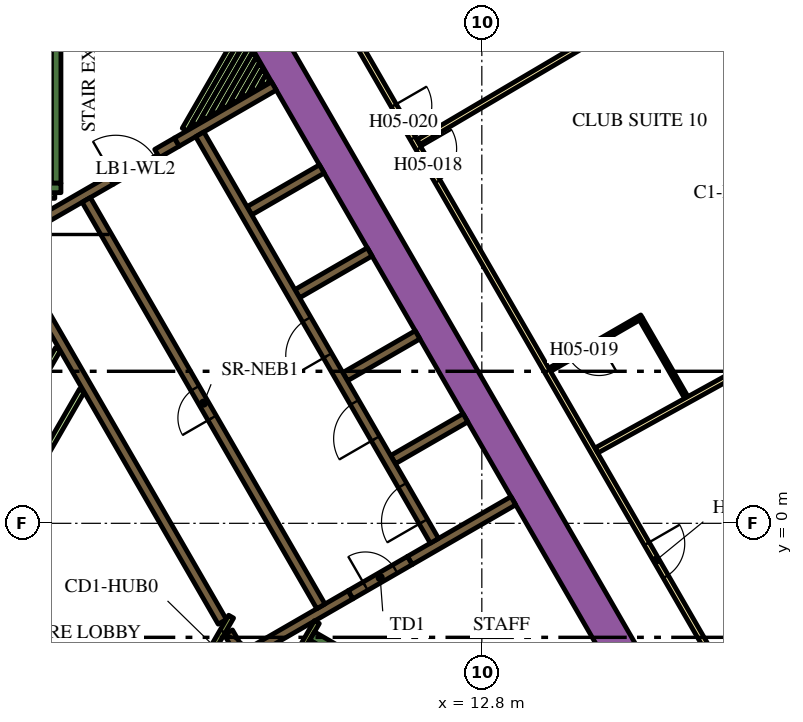
"""IFC4 building model, lengths in metres.
Left out: names, types, materials, properties, quantities, classifications, styles, units other than length and angle.
Written with IfcOpenShell. Run it as: python <this file> out.ifc"""

import sys

from ifc_helpers import new_model, si_unit, direction, frame, frame_2d, origin, place, context, subcontext, project, spatial, rectangle, extrude, element, fill, save


model = new_model("IFC4")
c1 = context("Model", 3, precision=1e-05, world=origin(), true_north=direction((0.0, 1.0)))
c2 = subcontext(c1, "Body", "Model", "MODEL_VIEW")
j1 = project(units=[si_unit("LENGTHUNIT", "METRE"), si_unit("PLANEANGLEUNIT", "RADIAN")], contexts=[c1])
p1 = place(None, origin())
s1 = spatial("IfcSite", under=j1, at=p1, CompositionType="ELEMENT")
p2 = place(p1, origin())
s2 = spatial("IfcBuilding", under=s1, at=p2, CompositionType="ELEMENT")
p3 = place(p2, frame((0.0, 0.0, 74.4)))
s3 = spatial("IfcBuildingStorey", under=s2, at=p3, CompositionType="ELEMENT", Elevation=74.4)
p4 = place(p3, frame((6.461, 13.909, 0.0), z_axis=(0.0, 0.0, 1.0), x_axis=(0.500005804227, -0.866022052686, 0.0)))
e1 = element("IfcWall", 1, at=p4, inside=s3, PredefinedType="SOLIDWALL", context=c2, shape_type="SweptSolid", body=[
    extrude(rectangle(XDim=20.834, YDim=0.9, at=frame_2d((10.417, 0.0))), origin(), (0.0, 0.0, 1.0), 3.9),
])
p5 = place(p3, frame((8.334, -2.964, 0.0), z_axis=(0.0, 0.0, 1.0), x_axis=(0.866016039709, -0.500016218704, 0.0)))
e2 = element("IfcWall", 2, at=p5, inside=s3, PredefinedType="SOLIDWALL", context=c2, shape_type="SweptSolid", body=[
    extrude(rectangle(XDim=7.05, YDim=0.25, at=frame_2d((3.525, 0.0))), origin(), (0.0, 0.0, 1.0), 3.9),
])
p6 = place(p3, frame((8.168, -3.503, 0.0), z_axis=(0.0, 0.0, 1.0), x_axis=(0.49972245349, 0.866185586049, 0.0)))
e3 = element("IfcWall", 3, at=p6, inside=s3, PredefinedType="SOLIDWALL", context=c2, shape_type="SweptSolid", body=[
    extrude(rectangle(XDim=0.425, YDim=0.25, at=frame_2d((0.212, 0.0))), origin(), (0.0, 0.0, 1.0), 3.9),
])
p7 = place(p3, frame((1.6, 8.95, 0.0), z_axis=(0.0, 0.0, 1.0), x_axis=(0.0, 1.0, 0.0)))
e4 = element("IfcWall", 4, at=p7, inside=s3, PredefinedType="SOLIDWALL", context=c2, shape_type="SweptSolid", body=[
    extrude(rectangle(XDim=6.8, YDim=0.25, at=frame_2d((3.4, 0.0))), origin(), (0.0, 0.0, 1.0), 3.9),
])
p8 = place(p3, frame((1.05, 8.825, 0.0), z_axis=(0.0, 0.0, 1.0), x_axis=(1.0, 0.0, 0.0)))
e5 = element("IfcWall", 5, at=p8, inside=s3, PredefinedType="SOLIDWALL", context=c2, shape_type="SweptSolid", body=[
    extrude(rectangle(XDim=0.675, YDim=0.25, at=frame_2d((0.337, 0.0))), origin(), (0.0, 0.0, 1.0), 3.9),
])
p9 = place(p3, frame((10.464, 1.677, 0.0), z_axis=(0.0, 0.0, 1.0), x_axis=(0.86605622881, 0.499946605688, 0.0)))
e6 = element("IfcWall", 6, at=p9, inside=s3, PredefinedType="SOLIDWALL", context=c2, shape_type="SweptSolid", body=[
    extrude(rectangle(XDim=2.2, YDim=0.25, at=frame_2d((1.1, 0.0))), origin(), (0.0, 0.0, 1.0), 3.9),
])
p10 = place(p3, frame((13.629, 0.594, 0.0), z_axis=(0.0, 0.0, 1.0), x_axis=(-0.86602790099, -0.499995674689, 0.0)))
e7 = element("IfcWall", 7, at=p10, inside=s3, PredefinedType="SOLIDWALL", context=c2, shape_type="SweptSolid", body=[
    extrude(rectangle(XDim=3.146, YDim=0.25, at=frame_2d((1.573, 0.0))), origin(), (0.0, 0.0, 1.0), 3.9),
])
p11 = place(p3, frame((9.346, -1.879, 0.0), z_axis=(0.0, 0.0, 1.0), x_axis=(-0.866048528039, -0.499959945477, 0.0)))
e8 = element("IfcWall", 8, at=p11, inside=s3, PredefinedType="SOLIDWALL", context=c2, shape_type="SweptSolid", body=[
    extrude(rectangle(XDim=3.47, YDim=0.25, at=frame_2d((1.735, 0.0))), origin(), (0.0, 0.0, 1.0), 3.9),
])
p12 = place(p3, frame((6.13, -2.867, 0.0), z_axis=(0.0, 0.0, 1.0), x_axis=(0.500160776593, -0.865932559475, 0.0)))
e9 = element("IfcWall", 9, at=p12, inside=s3, PredefinedType="SOLIDWALL", context=c2, shape_type="SweptSolid", body=[
    extrude(rectangle(XDim=0.627, YDim=0.25, at=frame_2d((0.313, 0.0))), origin(), (0.0, 0.0, 1.0), 3.9),
])
for number, where, z_axis, x_axis in (
    (10, (9.204, 3.859, 0.0), (0.0, 0.0, 1.0), (0.866, 0.5, 0.0)),
    (11, (7.944, 6.041, 0.0), (0.0, 0.0, 1.0), (0.866, 0.5, 0.0)),
    (12, (6.684, 8.224, 0.0), (0.0, 0.0, 1.0), (0.866, 0.5, 0.0)),
):
    element("IfcWall", number, at=place(p3, frame(where, z_axis=z_axis, x_axis=x_axis)), inside=s3, PredefinedType="SOLIDWALL", context=c2, shape_type="SweptSolid", body=[
        extrude(rectangle(XDim=2.2, YDim=0.25, at=frame_2d((1.1, 0.0))), origin(), (0.0, 0.0, 1.0), 3.9),
    ])
p13 = place(p3, frame((4.254, 9.731, 0.0), z_axis=(0.0, 0.0, 1.0), x_axis=(0.866056883327, 0.499945471869, 0.0)))
e13 = element("IfcWall", 13, at=p13, inside=s3, PredefinedType="SOLIDWALL", context=c2, shape_type="SweptSolid", body=[
    extrude(rectangle(XDim=0.6, YDim=0.25, at=frame_2d((0.3, 0.0))), origin(), (0.0, 0.0, 1.0), 3.9),
])
p14 = place(p3, frame((4.776, 10.032, 0.0), z_axis=(0.0, 0.0, 1.0), x_axis=(0.86600215702, 0.500040262416, 0.0)))
e14 = element("IfcWall", 14, at=p14, inside=s3, PredefinedType="SOLIDWALL", context=c2, shape_type="SweptSolid", body=[
    extrude(rectangle(XDim=2.948, YDim=0.25, at=frame_2d((1.474, 0.0))), origin(), (0.0, 0.0, 1.0), 3.9),
])
p15 = place(p3, frame((0.098, 7.331, 0.0), z_axis=(0.0, 0.0, 1.0), x_axis=(0.865988154826, 0.50006451154, 0.0)))
e15 = element("IfcWall", 15, at=p15, inside=s3, PredefinedType="SOLIDWALL", context=c2, shape_type="SweptSolid", body=[
    extrude(rectangle(XDim=3.398, YDim=0.25, at=frame_2d((1.699, 0.0))), origin(), (0.0, 0.0, 1.0), 3.9),
])
p16 = place(p3, frame((5.97, -2.591, 0.0), z_axis=(0.0, 0.0, 1.0), x_axis=(-0.499994469932, 0.866028596547, 0.0)))
e16 = element("IfcWall", 16, at=p16, inside=s3, PredefinedType="SOLIDWALL", context=c2, shape_type="SweptSolid", body=[
    extrude(rectangle(XDim=10.488, YDim=0.25, at=frame_2d((5.244, 0.0))), origin(), (0.0, 0.0, 1.0), 3.9),
])
p17 = place(p3, frame((8.459, -2.599, 0.0), z_axis=(0.0, 0.0, 1.0), x_axis=(-0.500041054325, -0.866001699761, 0.0)))
e17 = element("IfcWall", 17, at=p17, inside=s3, PredefinedType="PARTITIONING", context=c2, shape_type="SweptSolid", body=[
    extrude(rectangle(XDim=0.929, YDim=0.15, at=frame_2d((0.464, 0.0))), origin(), (0.0, 0.0, 1.0), 3.9),
])
p18 = place(p3, frame((-1.887, -3.718, 0.0), z_axis=(0.0, 0.0, 1.0), x_axis=(0.500005008002, 0.866022512394, 0.0)))
e18 = element("IfcWall", 18, at=p18, inside=s3, PredefinedType="PARTITIONING", context=c2, shape_type="SweptSolid", body=[
    extrude(rectangle(XDim=8.327, YDim=0.15, at=frame_2d((4.164, 0.0))), origin(), (0.0, 0.0, 1.0), 2.7),
])
p19 = place(p3, frame((-0.3, 1.212, 0.0), z_axis=(0.0, 0.0, 1.0), x_axis=(0.499963101113, 0.866046706318, 0.0)))
e19 = element("IfcWall", 19, at=p19, inside=s3, PredefinedType="PARTITIONING", context=c2, shape_type="SweptSolid", body=[
    extrude(rectangle(XDim=3.893, YDim=0.15, at=frame_2d((1.947, 0.0))), origin(), (0.0, 0.0, 1.0), 2.7),
])
p20 = place(p3, frame((1.05, 8.625, 0.0), z_axis=(0.0, 0.0, 1.0), x_axis=(1.0, 0.0, 0.0)))
e20 = element("IfcWall", 20, at=p20, inside=s3, PredefinedType="PARTITIONING", context=c2, shape_type="SweptSolid", body=[
    extrude(rectangle(XDim=0.514, YDim=0.15, at=frame_2d((0.257, 0.0))), origin(), (0.0, 0.0, 1.0), 2.7),
])
p21 = place(p3, frame((4.982, 10.359, 0.0), z_axis=(0.0, 0.0, 1.0), x_axis=(0.500051824031, 0.865995481099, 0.0)))
e21 = element("IfcWall", 21, at=p21, inside=s3, PredefinedType="PARTITIONING", context=c2, shape_type="SweptSolid", body=[
    extrude(rectangle(XDim=2.973, YDim=0.15, at=frame_2d((1.486, 0.0))), origin(), (0.0, 0.0, 1.0), 2.7),
])
p22 = place(p3, frame((5.242, 10.509, 0.0), z_axis=(0.0, 0.0, 1.0), x_axis=(0.499958506883, 0.866049358521, 0.0)))
e22 = element("IfcWall", 22, at=p22, inside=s3, PredefinedType="PARTITIONING", context=c2, shape_type="SweptSolid", body=[
    extrude(rectangle(XDim=2.626, YDim=0.15, at=frame_2d((1.313, 0.0))), origin(), (0.0, 0.0, 1.0), 2.7),
])
p23 = place(p3, frame((5.501, 10.659, 0.0), z_axis=(0.0, 0.0, 1.0), x_axis=(0.499951092774, 0.866053638543, 0.0)))
e23 = element("IfcWall", 23, at=p23, inside=s3, PredefinedType="PARTITIONING", context=c2, shape_type="SweptSolid", body=[
    extrude(rectangle(XDim=2.28, YDim=0.15, at=frame_2d((1.14, 0.0))), origin(), (0.0, 0.0, 1.0), 2.7),
])
p24 = place(p3, frame((5.761, 10.809, 0.0), z_axis=(0.0, 0.0, 1.0), x_axis=(0.499900985997, 0.866082561999, 0.0)))
e24 = element("IfcWall", 24, at=p24, inside=s3, PredefinedType="PARTITIONING", context=c2, shape_type="SweptSolid", body=[
    extrude(rectangle(XDim=1.934, YDim=0.15, at=frame_2d((0.967, 0.0))), origin(), (0.0, 0.0, 1.0), 2.7),
])
p25 = place(p3, frame((6.021, 10.959, 0.0), z_axis=(0.0, 0.0, 1.0), x_axis=(0.499944387978, 0.86605750902, 0.0)))
e25 = element("IfcWall", 25, at=p25, inside=s3, PredefinedType="PARTITIONING", context=c2, shape_type="SweptSolid", body=[
    extrude(rectangle(XDim=1.587, YDim=0.15, at=frame_2d((0.793, 0.0))), origin(), (0.0, 0.0, 1.0), 2.7),
])
p26 = place(p3, frame((6.281, 11.109, 0.0), z_axis=(0.0, 0.0, 1.0), x_axis=(0.500012022864, 0.866018462269, 0.0)))
e26 = element("IfcWall", 26, at=p26, inside=s3, PredefinedType="PARTITIONING", context=c2, shape_type="SweptSolid", body=[
    extrude(rectangle(XDim=1.241, YDim=0.15, at=frame_2d((0.62, 0.0))), origin(), (0.0, 0.0, 1.0), 2.7),
])
p27 = place(p3, frame((6.541, 11.259, 0.0), z_axis=(0.0, 0.0, 1.0), x_axis=(0.500132045864, 0.865949153646, 0.0)))
e27 = element("IfcWall", 27, at=p27, inside=s3, PredefinedType="PARTITIONING", context=c2, shape_type="SweptSolid", body=[
    extrude(rectangle(XDim=0.894, YDim=0.15, at=frame_2d((0.447, 0.0))), origin(), (0.0, 0.0, 1.0), 2.7),
])
p28 = place(p3, frame((6.8, 11.409, 0.0), z_axis=(0.0, 0.0, 1.0), x_axis=(0.500210807569, 0.865903659763, 0.0)))
e28 = element("IfcWall", 28, at=p28, inside=s3, PredefinedType="PARTITIONING", context=c2, shape_type="SweptSolid", body=[
    extrude(rectangle(XDim=0.548, YDim=0.15, at=frame_2d((0.274, 0.0))), origin(), (0.0, 0.0, 1.0), 2.7),
])
p29 = place(p3, frame((7.06, 11.559, 0.0), z_axis=(0.0, 0.0, 1.0), x_axis=(0.499267785915, 0.866447735266, 0.0)))
e29 = element("IfcWall", 29, at=p29, inside=s3, PredefinedType="PARTITIONING", context=c2, shape_type="SweptSolid", body=[
    extrude(rectangle(XDim=0.201, YDim=0.15, at=frame_2d((0.101, 0.0))), origin(), (0.0, 0.0, 1.0), 2.7),
])
p30 = place(p3, frame((11.553, -0.46, 0.0), z_axis=(0.0, 0.0, 1.0), x_axis=(-0.500006514828, 0.866021642414, 0.0)))
e30 = element("IfcWall", 30, at=p30, inside=s3, PredefinedType="SOLIDWALL", context=c2, shape_type="SweptSolid", body=[
    extrude(rectangle(XDim=12.35, YDim=0.25, at=frame_2d((6.175, 0.0))), origin(), (0.0, 0.0, 1.0), 3.9),
])
p31 = place(p30, frame((0.585, 0.0, 0.0)))
e31 = element("IfcOpeningElement", 31, at=p31, cuts=e30, PredefinedType="OPENING", context=c2, shape_type="SweptSolid", body=[
    extrude(rectangle(XDim=1.1, YDim=2.1, at=frame_2d((0.55, 1.05))), frame((0.0, 0.135, 0.0), z_axis=(0.0, -1.0, 0.0), x_axis=(1.0, 0.0, 0.0)), (0.0, 0.0, 1.0), 0.27),
])
p32 = place(p30, frame((3.105, 0.0, 0.0)))
e32 = element("IfcOpeningElement", 32, at=p32, cuts=e30, PredefinedType="OPENING", context=c2, shape_type="SweptSolid", body=[
    extrude(rectangle(XDim=1.1, YDim=2.1, at=frame_2d((0.55, 1.05))), frame((0.0, 0.135, 0.0), z_axis=(0.0, -1.0, 0.0), x_axis=(1.0, 0.0, 0.0)), (0.0, 0.0, 1.0), 0.27),
])
p33 = place(p30, frame((5.625, 0.0, 0.0)))
e33 = element("IfcOpeningElement", 33, at=p33, cuts=e30, PredefinedType="OPENING", context=c2, shape_type="SweptSolid", body=[
    extrude(rectangle(XDim=1.1, YDim=2.1, at=frame_2d((0.55, 1.05))), frame((0.0, 0.135, 0.0), z_axis=(0.0, -1.0, 0.0), x_axis=(1.0, 0.0, 0.0)), (0.0, 0.0, 1.0), 0.27),
])
p34 = place(p3, frame((8.565, -2.185, 0.0), z_axis=(0.0, 0.0, 1.0), x_axis=(-0.499997954832, 0.866026584559, 0.0)))
e34 = element("IfcWall", 34, at=p34, inside=s3, PredefinedType="SOLIDWALL", context=c2, shape_type="SweptSolid", body=[
    extrude(rectangle(XDim=12.35, YDim=0.25, at=frame_2d((6.175, 0.0))), origin(), (0.0, 0.0, 1.0), 3.9),
])
p35 = place(p34, frame((5.725, 0.0, 0.0)))
e35 = element("IfcOpeningElement", 35, at=p35, cuts=e34, PredefinedType="OPENING", context=c2, shape_type="SweptSolid", body=[
    extrude(rectangle(XDim=0.9, YDim=2.1, at=frame_2d((0.45, 1.05))), frame((0.0, 0.135, 0.0), z_axis=(0.0, -1.0, 0.0), x_axis=(1.0, 0.0, 0.0)), (0.0, 0.0, 1.0), 0.27),
])
p36 = place(p3, frame((9.346, -1.879, 0.0), z_axis=(0.0, 0.0, 1.0), x_axis=(0.866047807691, 0.499961193289, 0.0)))
e36 = element("IfcWall", 36, at=p36, inside=s3, PredefinedType="SOLIDWALL", context=c2, shape_type="SweptSolid", body=[
    extrude(rectangle(XDim=1.8, YDim=0.25, at=frame_2d((0.9, 0.0))), origin(), (0.0, 0.0, 1.0), 3.9),
])
p37 = place(p36, frame((0.45, 0.0, 0.0)))
e37 = element("IfcOpeningElement", 37, at=p37, cuts=e36, PredefinedType="OPENING", context=c2, shape_type="SweptSolid", body=[
    extrude(rectangle(XDim=0.9, YDim=2.1, at=frame_2d((0.45, 1.05))), frame((0.0, 0.135, 0.0), z_axis=(0.0, -1.0, 0.0), x_axis=(1.0, 0.0, 0.0)), (0.0, 0.0, 1.0), 0.27),
])
p38 = place(p3, frame((6.203, -2.456, 0.0), z_axis=(0.0, 0.0, 1.0), x_axis=(-0.500043961785, -0.866000020948, 0.0)))
e38 = element("IfcWall", 38, at=p38, inside=s3, PredefinedType="PARTITIONING", context=c2, shape_type="SweptSolid", body=[
    extrude(rectangle(XDim=1.95, YDim=0.15, at=frame_2d((0.975, 0.0))), origin(), (0.0, 0.0, 1.0), 3.9),
])
p39 = place(p38, frame((0.45, 0.0, 0.0)))
e39 = element("IfcOpeningElement", 39, at=p39, cuts=e38, PredefinedType="OPENING", context=c2, shape_type="SweptSolid", body=[
    extrude(rectangle(XDim=0.9, YDim=2.1, at=frame_2d((0.45, 1.05))), frame((0.0, 0.085, 0.0), z_axis=(0.0, -1.0, 0.0), x_axis=(1.0, 0.0, 0.0)), (0.0, 0.0, 1.0), 0.17),
])
p40 = place(p3, frame((3.081, 8.961, 0.0), z_axis=(0.0, 0.0, 1.0), x_axis=(0.866034573852, 0.49998411664, 0.0)))
e40 = element("IfcWall", 40, at=p40, inside=s3, PredefinedType="PARTITIONING", context=c2, shape_type="SweptSolid", body=[
    extrude(rectangle(XDim=1.4, YDim=0.09, at=frame_2d((0.7, 0.0))), origin(), (0.0, 0.0, 1.0), 2.7),
])
p41 = place(p40, frame((0.1, 0.0, 0.0)))
e41 = element("IfcOpeningElement", 41, at=p41, cuts=e40, PredefinedType="OPENING", context=c2, shape_type="SweptSolid", body=[
    extrude(rectangle(XDim=1.2, YDim=2.1, at=frame_2d((0.6, 1.05))), frame((0.0, 0.055, 0.0), z_axis=(0.0, -1.0, 0.0), x_axis=(1.0, 0.0, 0.0)), (0.0, 0.0, 1.0), 0.11),
])
p42 = place(p3, frame((6.163, 18.475, 0.0), z_axis=(0.0, 0.0, 1.0), x_axis=(0.500001317485, -0.866024643133, 0.0)))
e42 = element("IfcWall", 42, at=p42, inside=s3, PredefinedType="PARTITIONING", context=c2, shape_type="SweptSolid", body=[
    extrude(rectangle(XDim=25.767, YDim=0.15, at=frame_2d((12.883, 0.0))), origin(), (0.0, 0.0, 1.0), 2.7),
])
p43 = place(p42, frame((21.953, 0.0, 0.0)))
e43 = element("IfcOpeningElement", 43, at=p43, cuts=e42, PredefinedType="OPENING", context=c2, shape_type="SweptSolid", body=[
    extrude(rectangle(XDim=1.0, YDim=2.1, at=frame_2d((0.5, 1.05))), frame((0.0, 0.085, 0.0), z_axis=(0.0, -1.0, 0.0), x_axis=(1.0, 0.0, 0.0)), (0.0, 0.0, 1.0), 0.17),
])
p44 = place(p42, frame((9.948, 0.0, 0.0)))
e44 = element("IfcOpeningElement", 44, at=p44, cuts=e42, PredefinedType="OPENING", context=c2, shape_type="SweptSolid", body=[
    extrude(rectangle(XDim=1.0, YDim=2.1, at=frame_2d((0.5, 1.05))), frame((0.0, 0.085, 0.0), z_axis=(0.0, -1.0, 0.0), x_axis=(1.0, 0.0, 0.0)), (0.0, 0.0, 1.0), 0.17),
])
p45 = place(p42, frame((8.641, 0.0, 0.0)))
e45 = element("IfcOpeningElement", 45, at=p45, cuts=e42, PredefinedType="OPENING", context=c2, shape_type="SweptSolid", body=[
    extrude(rectangle(XDim=1.0, YDim=2.1, at=frame_2d((0.5, 1.05))), frame((0.0, 0.085, 0.0), z_axis=(0.0, -1.0, 0.0), x_axis=(1.0, 0.0, 0.0)), (0.0, 0.0, 1.0), 0.17),
])
p46 = place(p3, frame((17.856, 13.999, 0.0), z_axis=(0.0, 0.0, 1.0), x_axis=(-0.861371519381, -0.507975497047, 0.0)))
e46 = element("IfcWall", 46, at=p46, inside=s3, PredefinedType="PARTITIONING", context=c2, shape_type="SweptSolid", body=[
    extrude(rectangle(XDim=7.804, YDim=0.15, at=frame_2d((3.902, 0.0))), origin(), (0.0, 0.0, 1.0), 2.7),
])
p47 = place(p3, frame((23.132, 5.962, 0.0), z_axis=(0.0, 0.0, 1.0), x_axis=(-0.875121716713, -0.483902863121, 0.0)))
e47 = element("IfcWall", 47, at=p47, inside=s3, PredefinedType="PARTITIONING", context=c2, shape_type="SweptSolid", body=[
    extrude(rectangle(XDim=8.355, YDim=0.15, at=frame_2d((4.178, 0.0))), origin(), (0.0, 0.0, 1.0), 2.7),
])
p48 = place(p3, frame((17.009, 5.439, 0.0), z_axis=(0.0, 0.0, 1.0), x_axis=(-0.865996816683, -0.500049511043, 0.0)))
e48 = element("IfcWall", 48, at=p48, inside=s3, PredefinedType="PARTITIONING", context=c2, shape_type="SweptSolid", body=[
    extrude(rectangle(XDim=2.8, YDim=0.1, at=frame_2d((1.4, 0.0))), origin(), (0.0, 0.0, 1.0), 2.7),
])
p49 = place(p48, frame((1.3, 0.0, 0.0)))
e49 = element("IfcOpeningElement", 49, at=p49, cuts=e48, PredefinedType="OPENING", context=c2, shape_type="SweptSolid", body=[
    extrude(rectangle(XDim=0.9, YDim=2.1, at=frame_2d((0.45, 1.05))), frame((0.0, 0.06, 0.0), z_axis=(0.0, -1.0, 0.0), x_axis=(1.0, 0.0, 0.0)), (0.0, 0.0, 1.0), 0.12),
])
p50 = place(p3, frame((16.991, 5.371, 0.0), z_axis=(0.0, 0.0, 1.0), x_axis=(0.499939447199, -0.866060361138, 0.0)))
e50 = element("IfcWall", 50, at=p50, inside=s3, PredefinedType="PARTITIONING", context=c2, shape_type="SweptSolid", body=[
    extrude(rectangle(XDim=2.37, YDim=0.1, at=frame_2d((1.185, 0.0))), origin(), (0.0, 0.0, 1.0), 2.7),
])
p51 = place(p3, frame((21.357, 9.445, 0.0), z_axis=(0.0, 0.0, 1.0), x_axis=(-0.50002123722, 0.866013142123, 0.0)))
e51 = element("IfcWall", 51, at=p51, inside=s3, PredefinedType="SOLIDWALL", context=c2, shape_type="SweptSolid", body=[
    extrude(rectangle(XDim=4.998, YDim=0.29, at=frame_2d((2.499, 0.0))), origin(), (0.0, 0.0, 1.0), 3.6),
])
p52 = place(p51, frame((0.297, 0.0, 0.9)))
e52 = element("IfcOpeningElement", 52, at=p52, cuts=e51, PredefinedType="OPENING", context=c2, shape_type="SweptSolid", body=[
    extrude(rectangle(XDim=1.2, YDim=2.15, at=frame_2d((0.6, 1.075))), frame((0.0, 0.155, 0.0), z_axis=(0.0, -1.0, 0.0), x_axis=(1.0, 0.0, 0.0)), (0.0, 0.0, 1.0), 0.31),
])
p53 = place(p51, frame((3.501, 0.0, 0.9)))
e53 = element("IfcOpeningElement", 53, at=p53, cuts=e51, PredefinedType="OPENING", context=c2, shape_type="SweptSolid", body=[
    extrude(rectangle(XDim=1.2, YDim=2.15, at=frame_2d((0.6, 1.075))), frame((0.0, 0.155, 0.0), z_axis=(0.0, -1.0, 0.0), x_axis=(1.0, 0.0, 0.0)), (0.0, 0.0, 1.0), 0.31),
])
p54 = place(p31, origin())
e54 = element("IfcDoor", 54, at=p54, inside=s3, OperationType="DOUBLE_DOOR_SLIDING", PredefinedType="DOOR", context=c2, shape_type="SweptSolid", body=[
    extrude(rectangle(XDim=1.1, YDim=2.1, at=frame_2d((0.55, 1.05))), frame((0.0, 0.025, 0.0), z_axis=(0.0, -1.0, 0.0), x_axis=(1.0, 0.0, 0.0)), (0.0, 0.0, 1.0), 0.05),
])
fill(e31, e54)
p55 = place(p32, origin())
e55 = element("IfcDoor", 55, at=p55, inside=s3, OperationType="DOUBLE_DOOR_SLIDING", PredefinedType="DOOR", context=c2, shape_type="SweptSolid", body=[
    extrude(rectangle(XDim=1.1, YDim=2.1, at=frame_2d((0.55, 1.05))), frame((0.0, 0.025, 0.0), z_axis=(0.0, -1.0, 0.0), x_axis=(1.0, 0.0, 0.0)), (0.0, 0.0, 1.0), 0.05),
])
fill(e32, e55)
p56 = place(p33, origin())
e56 = element("IfcDoor", 56, at=p56, inside=s3, OperationType="DOUBLE_DOOR_SLIDING", PredefinedType="DOOR", context=c2, shape_type="SweptSolid", body=[
    extrude(rectangle(XDim=1.1, YDim=2.1, at=frame_2d((0.55, 1.05))), frame((0.0, 0.025, 0.0), z_axis=(0.0, -1.0, 0.0), x_axis=(1.0, 0.0, 0.0)), (0.0, 0.0, 1.0), 0.05),
])
fill(e33, e56)
p57 = place(p35, origin())
e57 = element("IfcDoor", 57, at=p57, inside=s3, OperationType="SINGLE_SWING_LEFT", PredefinedType="DOOR", context=c2, shape_type="SweptSolid", body=[
    extrude(rectangle(XDim=0.9, YDim=2.1, at=frame_2d((0.45, 1.05))), frame((0.0, 0.025, 0.0), z_axis=(0.0, -1.0, 0.0), x_axis=(1.0, 0.0, 0.0)), (0.0, 0.0, 1.0), 0.05),
])
fill(e35, e57)
p58 = place(p37, origin())
e58 = element("IfcDoor", 58, at=p58, inside=s3, OperationType="SINGLE_SWING_LEFT", PredefinedType="DOOR", context=c2, shape_type="SweptSolid", body=[
    extrude(rectangle(XDim=0.9, YDim=2.1, at=frame_2d((0.45, 1.05))), frame((0.0, 0.025, 0.0), z_axis=(0.0, -1.0, 0.0), x_axis=(1.0, 0.0, 0.0)), (0.0, 0.0, 1.0), 0.05),
])
fill(e37, e58)
p59 = place(p39, origin())
e59 = element("IfcDoor", 59, at=p59, inside=s3, OperationType="SINGLE_SWING_LEFT", PredefinedType="DOOR", context=c2, shape_type="SweptSolid", body=[
    extrude(rectangle(XDim=0.9, YDim=2.1, at=frame_2d((0.45, 1.05))), frame((0.0, 0.025, 0.0), z_axis=(0.0, -1.0, 0.0), x_axis=(1.0, 0.0, 0.0)), (0.0, 0.0, 1.0), 0.05),
])
fill(e39, e59)
p60 = place(p41, origin())
e60 = element("IfcDoor", 60, at=p60, inside=s3, OperationType="SINGLE_SWING_LEFT", PredefinedType="DOOR", context=c2, shape_type="SweptSolid", body=[
    extrude(rectangle(XDim=1.2, YDim=2.1, at=frame_2d((0.6, 1.05))), frame((0.0, 0.025, 0.0), z_axis=(0.0, -1.0, 0.0), x_axis=(1.0, 0.0, 0.0)), (0.0, 0.0, 1.0), 0.05),
])
fill(e41, e60)
p61 = place(p43, origin())
e61 = element("IfcDoor", 61, at=p61, inside=s3, OperationType="SINGLE_SWING_LEFT", PredefinedType="DOOR", context=c2, shape_type="SweptSolid", body=[
    extrude(rectangle(XDim=1.0, YDim=2.1, at=frame_2d((0.5, 1.05))), frame((0.0, 0.025, 0.0), z_axis=(0.0, -1.0, 0.0), x_axis=(1.0, 0.0, 0.0)), (0.0, 0.0, 1.0), 0.05),
])
fill(e43, e61)
p62 = place(p44, origin())
e62 = element("IfcDoor", 62, at=p62, inside=s3, OperationType="SINGLE_SWING_LEFT", PredefinedType="DOOR", context=c2, shape_type="SweptSolid", body=[
    extrude(rectangle(XDim=1.0, YDim=2.1, at=frame_2d((0.5, 1.05))), frame((0.0, 0.025, 0.0), z_axis=(0.0, -1.0, 0.0), x_axis=(1.0, 0.0, 0.0)), (0.0, 0.0, 1.0), 0.05),
])
fill(e44, e62)
p63 = place(p49, origin())
e63 = element("IfcDoor", 63, at=p63, inside=s3, OperationType="SINGLE_SWING_LEFT", PredefinedType="DOOR", context=c2, shape_type="SweptSolid", body=[
    extrude(rectangle(XDim=0.9, YDim=2.1, at=frame_2d((0.45, 1.05))), frame((0.0, 0.025, 0.0), z_axis=(0.0, -1.0, 0.0), x_axis=(1.0, 0.0, 0.0)), (0.0, 0.0, 1.0), 0.05),
])
fill(e49, e63)
p64 = place(p45, origin())
e64 = element("IfcDoor", 64, at=p64, inside=s3, OperationType="SINGLE_SWING_RIGHT", PredefinedType="DOOR", context=c2, shape_type="SweptSolid", body=[
    extrude(rectangle(XDim=1.0, YDim=2.1, at=frame_2d((0.5, 1.05))), frame((0.0, 0.025, 0.0), z_axis=(0.0, -1.0, 0.0), x_axis=(1.0, 0.0, 0.0)), (0.0, 0.0, 1.0), 0.05),
])
fill(e45, e64)
save(model, sys.argv[1])
